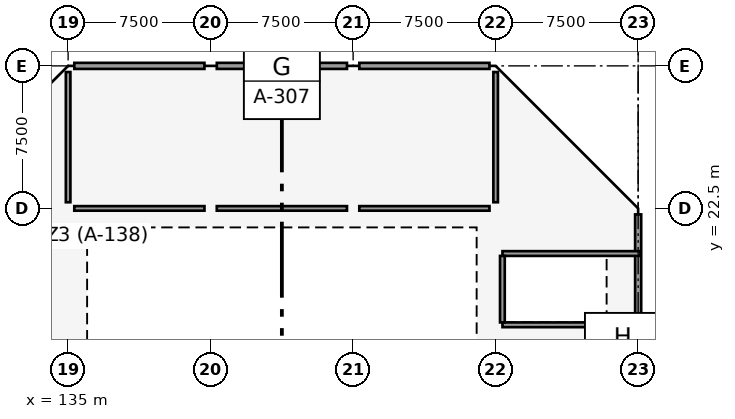
"""IFC4 building model, lengths in metres.
Left out: names, types, materials, properties, quantities, classifications, styles, units other than length and angle.
Written with IfcOpenShell. Run it as: python <this file> out.ifc"""

import sys

from ifc_helpers import new_model, si_unit, direction, frame, frame_2d, origin, origin_2d, place, context, subcontext, project, spatial, rectangle, extrude, element, fill, save


model = new_model("IFC4")
c1 = context("Model", 3, precision=1e-05, world=origin(), true_north=direction((0.0, 1.0)))
c2 = subcontext(c1, "Body", "Model", "MODEL_VIEW")
j1 = project(units=[si_unit("LENGTHUNIT", "METRE"), si_unit("PLANEANGLEUNIT", "RADIAN")], contexts=[c1])
p1 = place(None, origin())
s1 = spatial("IfcSite", under=j1, at=p1, CompositionType="ELEMENT")
p2 = place(p1, origin())
s2 = spatial("IfcBuilding", under=s1, at=p2, CompositionType="ELEMENT")
p3 = place(p2, frame((0.0, 0.0, 9.0)))
s3 = spatial("IfcBuildingStorey", under=s2, at=p3, CompositionType="ELEMENT", Elevation=9.0)
for number, where, z_axis, x_axis in (
    (1, (135.0, 22.5, 0.0), (0.0, 0.0, 1.0), (1.0, 0.0, 0.0)),
    (2, (135.0, 30.0, 0.0), (0.0, 0.0, 1.0), (1.0, 0.0, 0.0)),
    (3, (142.5, 22.5, 0.0), (0.0, 0.0, 1.0), (1.0, 0.0, 0.0)),
    (4, (142.5, 30.0, 0.0), (0.0, 0.0, 1.0), (1.0, 0.0, 0.0)),
    (5, (150.0, 22.5, 0.0), (0.0, 0.0, 1.0), (1.0, 0.0, 0.0)),
    (6, (150.0, 30.0, 0.0), (0.0, 0.0, 1.0), (1.0, 0.0, 0.0)),
    (7, (157.5, 22.5, 0.0), (0.0, 0.0, 1.0), (1.0, 0.0, 0.0)),
    (8, (157.5, 30.0, 0.0), (0.0, 0.0, 1.0), (1.0, 0.0, 0.0)),
    (9, (165.0, 22.5, 0.0), (0.0, 0.0, 1.0), (1.0, 0.0, 0.0)),
):
    element("IfcColumn", number, at=place(p3, frame(where, z_axis=z_axis, x_axis=x_axis)), inside=s3, PredefinedType="COLUMN", context=c2, shape_type="SweptSolid", body=[
        extrude(rectangle(XDim=0.62, YDim=0.62, at=origin_2d()), origin(), (0.0, 0.0, 1.0), 4.2),
    ])
p4 = place(p3, frame((165.0, 15.325, 0.0), z_axis=(0.0, 0.0, 1.0), x_axis=(0.0, 1.0, 0.0)))
e10 = element("IfcWall", 10, at=p4, inside=s3, PredefinedType="SOLIDWALL", context=c2, shape_type="SweptSolid", body=[
    extrude(rectangle(XDim=6.86, YDim=0.32, at=frame_2d((3.43, 0.0))), origin(), (0.0, 0.0, 1.0), 2.92),
])
p5 = place(p4, frame((2.35, 0.0, 0.6)))
e11 = element("IfcOpeningElement", 11, at=p5, cuts=e10, PredefinedType="OPENING", context=c2, shape_type="SweptSolid", body=[
    extrude(rectangle(XDim=2.15, YDim=1.45, at=frame_2d((1.075, 0.725))), frame((0.0, 0.17, 0.0), z_axis=(0.0, -1.0, 0.0), x_axis=(1.0, 0.0, 0.0)), (0.0, 0.0, 1.0), 0.34),
])
p6 = place(p3, frame((157.175, 30.0, 0.0), z_axis=(0.0, 0.0, 1.0), x_axis=(-1.0, 0.0, 0.0)))
e12 = element("IfcWall", 12, at=p6, inside=s3, PredefinedType="SOLIDWALL", context=c2, shape_type="SweptSolid", body=[
    extrude(rectangle(XDim=6.85, YDim=0.32, at=frame_2d((3.425, 0.0))), origin(), (0.0, 0.0, 1.0), 3.12),
])
p7 = place(p6, frame((2.7, 0.0, 0.6)))
e13 = element("IfcOpeningElement", 13, at=p7, cuts=e12, PredefinedType="OPENING", context=c2, shape_type="SweptSolid", body=[
    extrude(rectangle(XDim=1.45, YDim=1.3, at=frame_2d((0.725, 0.65))), frame((0.0, 0.17, 0.0), z_axis=(0.0, -1.0, 0.0), x_axis=(1.0, 0.0, 0.0)), (0.0, 0.0, 1.0), 0.34),
])
p8 = place(p3, frame((149.675, 30.0, 0.0), z_axis=(0.0, 0.0, 1.0), x_axis=(-1.0, 0.0, 0.0)))
e14 = element("IfcWall", 14, at=p8, inside=s3, PredefinedType="SOLIDWALL", context=c2, shape_type="SweptSolid", body=[
    extrude(rectangle(XDim=6.85, YDim=0.32, at=frame_2d((3.425, 0.0))), origin(), (0.0, 0.0, 1.0), 3.12),
])
p9 = place(p8, frame((2.625, 0.0, 0.6)))
e15 = element("IfcOpeningElement", 15, at=p9, cuts=e14, PredefinedType="OPENING", context=c2, shape_type="SweptSolid", body=[
    extrude(rectangle(XDim=1.6, YDim=1.3, at=frame_2d((0.8, 0.65))), frame((0.0, 0.17, 0.0), z_axis=(0.0, -1.0, 0.0), x_axis=(1.0, 0.0, 0.0)), (0.0, 0.0, 1.0), 0.34),
])
p10 = place(p3, frame((142.175, 30.0, 0.0), z_axis=(0.0, 0.0, 1.0), x_axis=(-1.0, 0.0, 0.0)))
e16 = element("IfcWall", 16, at=p10, inside=s3, PredefinedType="SOLIDWALL", context=c2, shape_type="SweptSolid", body=[
    extrude(rectangle(XDim=6.85, YDim=0.32, at=frame_2d((3.425, 0.0))), origin(), (0.0, 0.0, 1.0), 3.12),
])
p11 = place(p10, frame((2.55, 0.0, 0.6)))
e17 = element("IfcOpeningElement", 17, at=p11, cuts=e16, PredefinedType="OPENING", context=c2, shape_type="SweptSolid", body=[
    extrude(rectangle(XDim=1.75, YDim=1.3, at=frame_2d((0.875, 0.65))), frame((0.0, 0.17, 0.0), z_axis=(0.0, -1.0, 0.0), x_axis=(1.0, 0.0, 0.0)), (0.0, 0.0, 1.0), 0.34),
])
p12 = place(p3, frame((157.86, 16.375, 0.0), z_axis=(0.0, 0.0, 1.0), x_axis=(1.0, 0.0, 0.0)))
e18 = element("IfcWall", 18, at=p12, inside=s3, PredefinedType="SOLIDWALL", context=c2, shape_type="SweptSolid", body=[
    extrude(rectangle(XDim=7.26, YDim=0.25, at=frame_2d((3.63, 0.0))), origin(), (0.0, 0.0, 1.0), 3.92),
])
p13 = place(p12, frame((5.71, 0.0, 0.0)))
e19 = element("IfcOpeningElement", 19, at=p13, cuts=e18, PredefinedType="OPENING", context=c2, shape_type="SweptSolid", body=[
    extrude(rectangle(XDim=1.1, YDim=2.15, at=frame_2d((0.55, 1.075))), frame((0.0, 0.135, 0.0), z_axis=(0.0, -1.0, 0.0), x_axis=(1.0, 0.0, 0.0)), (0.0, 0.0, 1.0), 0.27),
])
p14 = place(p3, frame((157.86, 20.125, 0.0), z_axis=(0.0, 0.0, 1.0), x_axis=(1.0, 0.0, 0.0)))
e20 = element("IfcWall", 20, at=p14, inside=s3, PredefinedType="SOLIDWALL", context=c2, shape_type="SweptSolid", body=[
    extrude(rectangle(XDim=7.26, YDim=0.25, at=frame_2d((3.63, 0.0))), origin(), (0.0, 0.0, 1.0), 3.92),
])
p15 = place(p3, frame((157.855, 16.5, 0.0), z_axis=(0.0, 0.0, 1.0), x_axis=(0.0, 1.0, 0.0)))
e21 = element("IfcWall", 21, at=p15, inside=s3, PredefinedType="SOLIDWALL", context=c2, shape_type="SweptSolid", body=[
    extrude(rectangle(XDim=3.5, YDim=0.25, at=frame_2d((1.75, 0.0))), origin(), (0.0, 0.0, 1.0), 3.92),
])
p16 = place(p3, frame((135.324, 22.5, 0.0), z_axis=(0.0, 0.0, 1.0), x_axis=(1.0, 0.0, 0.0)))
e22 = element("IfcWall", 22, at=p16, inside=s3, PredefinedType="PARTITIONING", context=c2, shape_type="SweptSolid", body=[
    extrude(rectangle(XDim=6.852, YDim=0.24, at=frame_2d((3.426, 0.0))), origin(), (0.0, 0.0, 1.0), 2.82),
])
for number, where, z_axis, x_axis in (
    (23, (142.824, 22.5, 0.0), (0.0, 0.0, 1.0), (1.0, 0.0, 0.0)),
    (24, (150.324, 22.5, 0.0), (0.0, 0.0, 1.0), (1.0, 0.0, 0.0)),
):
    element("IfcWall", number, at=place(p3, frame(where, z_axis=z_axis, x_axis=x_axis)), inside=s3, PredefinedType="PARTITIONING", context=c2, shape_type="SweptSolid", body=[
        extrude(rectangle(XDim=6.852, YDim=0.24, at=frame_2d((3.426, 0.0))), origin(), (0.0, 0.0, 1.0), 2.87),
    ])
p17 = place(p3, frame((135.0, 22.824, 0.0), z_axis=(0.0, 0.0, 1.0), x_axis=(0.0, 1.0, 0.0)))
e25 = element("IfcWall", 25, at=p17, inside=s3, PredefinedType="PARTITIONING", context=c2, shape_type="SweptSolid", body=[
    extrude(rectangle(XDim=6.852, YDim=0.24, at=frame_2d((3.426, 0.0))), origin(), (0.0, 0.0, 1.0), 2.82),
])
p18 = place(p17, frame((2.526, 0.0, 0.0)))
e26 = element("IfcOpeningElement", 26, at=p18, cuts=e25, PredefinedType="OPENING", context=c2, shape_type="SweptSolid", body=[
    extrude(rectangle(XDim=1.8, YDim=2.16, at=frame_2d((0.9, 1.08))), frame((0.0, 0.13, 0.0), z_axis=(0.0, -1.0, 0.0), x_axis=(1.0, 0.0, 0.0)), (0.0, 0.0, 1.0), 0.26),
])
p19 = place(p3, frame((157.5, 22.824, 0.0), z_axis=(0.0, 0.0, 1.0), x_axis=(0.0, 1.0, 0.0)))
e27 = element("IfcWall", 27, at=p19, inside=s3, PredefinedType="PARTITIONING", context=c2, shape_type="SweptSolid", body=[
    extrude(rectangle(XDim=6.852, YDim=0.24, at=frame_2d((3.426, 0.0))), origin(), (0.0, 0.0, 1.0), 2.92),
])
p20 = place(p19, frame((2.526, 0.0, 0.0)))
e28 = element("IfcOpeningElement", 28, at=p20, cuts=e27, PredefinedType="OPENING", context=c2, shape_type="SweptSolid", body=[
    extrude(rectangle(XDim=1.8, YDim=2.16, at=frame_2d((0.9, 1.08))), frame((0.0, 0.13, 0.0), z_axis=(0.0, -1.0, 0.0), x_axis=(1.0, 0.0, 0.0)), (0.0, 0.0, 1.0), 0.26),
])
p21 = place(p5, origin())
e29 = element("IfcWindow", 29, at=p21, inside=s3, PartitioningType="SINGLE_PANEL", PredefinedType="WINDOW", context=c2, shape_type="SweptSolid", body=[
    extrude(rectangle(XDim=2.15, YDim=1.45, at=frame_2d((1.075, 0.725))), frame((0.0, 0.03, 0.0), z_axis=(0.0, -1.0, 0.0), x_axis=(1.0, 0.0, 0.0)), (0.0, 0.0, 1.0), 0.06),
])
fill(e11, e29)
p22 = place(p7, origin())
e30 = element("IfcWindow", 30, at=p22, inside=s3, PartitioningType="SINGLE_PANEL", PredefinedType="WINDOW", context=c2, shape_type="SweptSolid", body=[
    extrude(rectangle(XDim=1.45, YDim=1.3, at=frame_2d((0.725, 0.65))), frame((0.0, 0.03, 0.0), z_axis=(0.0, -1.0, 0.0), x_axis=(1.0, 0.0, 0.0)), (0.0, 0.0, 1.0), 0.06),
])
fill(e13, e30)
p23 = place(p9, origin())
e31 = element("IfcWindow", 31, at=p23, inside=s3, PartitioningType="SINGLE_PANEL", PredefinedType="WINDOW", context=c2, shape_type="SweptSolid", body=[
    extrude(rectangle(XDim=1.6, YDim=1.3, at=frame_2d((0.8, 0.65))), frame((0.0, 0.03, 0.0), z_axis=(0.0, -1.0, 0.0), x_axis=(1.0, 0.0, 0.0)), (0.0, 0.0, 1.0), 0.06),
])
fill(e15, e31)
p24 = place(p11, origin())
e32 = element("IfcWindow", 32, at=p24, inside=s3, PartitioningType="SINGLE_PANEL", PredefinedType="WINDOW", context=c2, shape_type="SweptSolid", body=[
    extrude(rectangle(XDim=1.75, YDim=1.3, at=frame_2d((0.875, 0.65))), frame((0.0, 0.03, 0.0), z_axis=(0.0, -1.0, 0.0), x_axis=(1.0, 0.0, 0.0)), (0.0, 0.0, 1.0), 0.06),
])
fill(e17, e32)
p25 = place(p13, origin())
e33 = element("IfcDoor", 33, at=p25, inside=s3, OperationType="SINGLE_SWING_RIGHT", PredefinedType="DOOR", context=c2, shape_type="SweptSolid", body=[
    extrude(rectangle(XDim=1.1, YDim=2.15, at=frame_2d((0.55, 1.075))), frame((0.0, 0.025, 0.0), z_axis=(0.0, -1.0, 0.0), x_axis=(1.0, 0.0, 0.0)), (0.0, 0.0, 1.0), 0.05),
])
fill(e19, e33)
p26 = place(p18, origin())
e34 = element("IfcDoor", 34, at=p26, inside=s3, OperationType="SINGLE_SWING_RIGHT", PredefinedType="DOOR", context=c2, shape_type="SweptSolid", body=[
    extrude(rectangle(XDim=1.8, YDim=2.16, at=frame_2d((0.9, 1.08))), frame((0.0, 0.025, 0.0), z_axis=(0.0, -1.0, 0.0), x_axis=(1.0, 0.0, 0.0)), (0.0, 0.0, 1.0), 0.05),
])
fill(e26, e34)
p27 = place(p20, origin())
e35 = element("IfcDoor", 35, at=p27, inside=s3, OperationType="SINGLE_SWING_LEFT", PredefinedType="DOOR", context=c2, shape_type="SweptSolid", body=[
    extrude(rectangle(XDim=1.8, YDim=2.16, at=frame_2d((0.9, 1.08))), frame((0.0, 0.025, 0.0), z_axis=(0.0, -1.0, 0.0), x_axis=(1.0, 0.0, 0.0)), (0.0, 0.0, 1.0), 0.05),
])
fill(e28, e35)
save(model, sys.argv[1])
